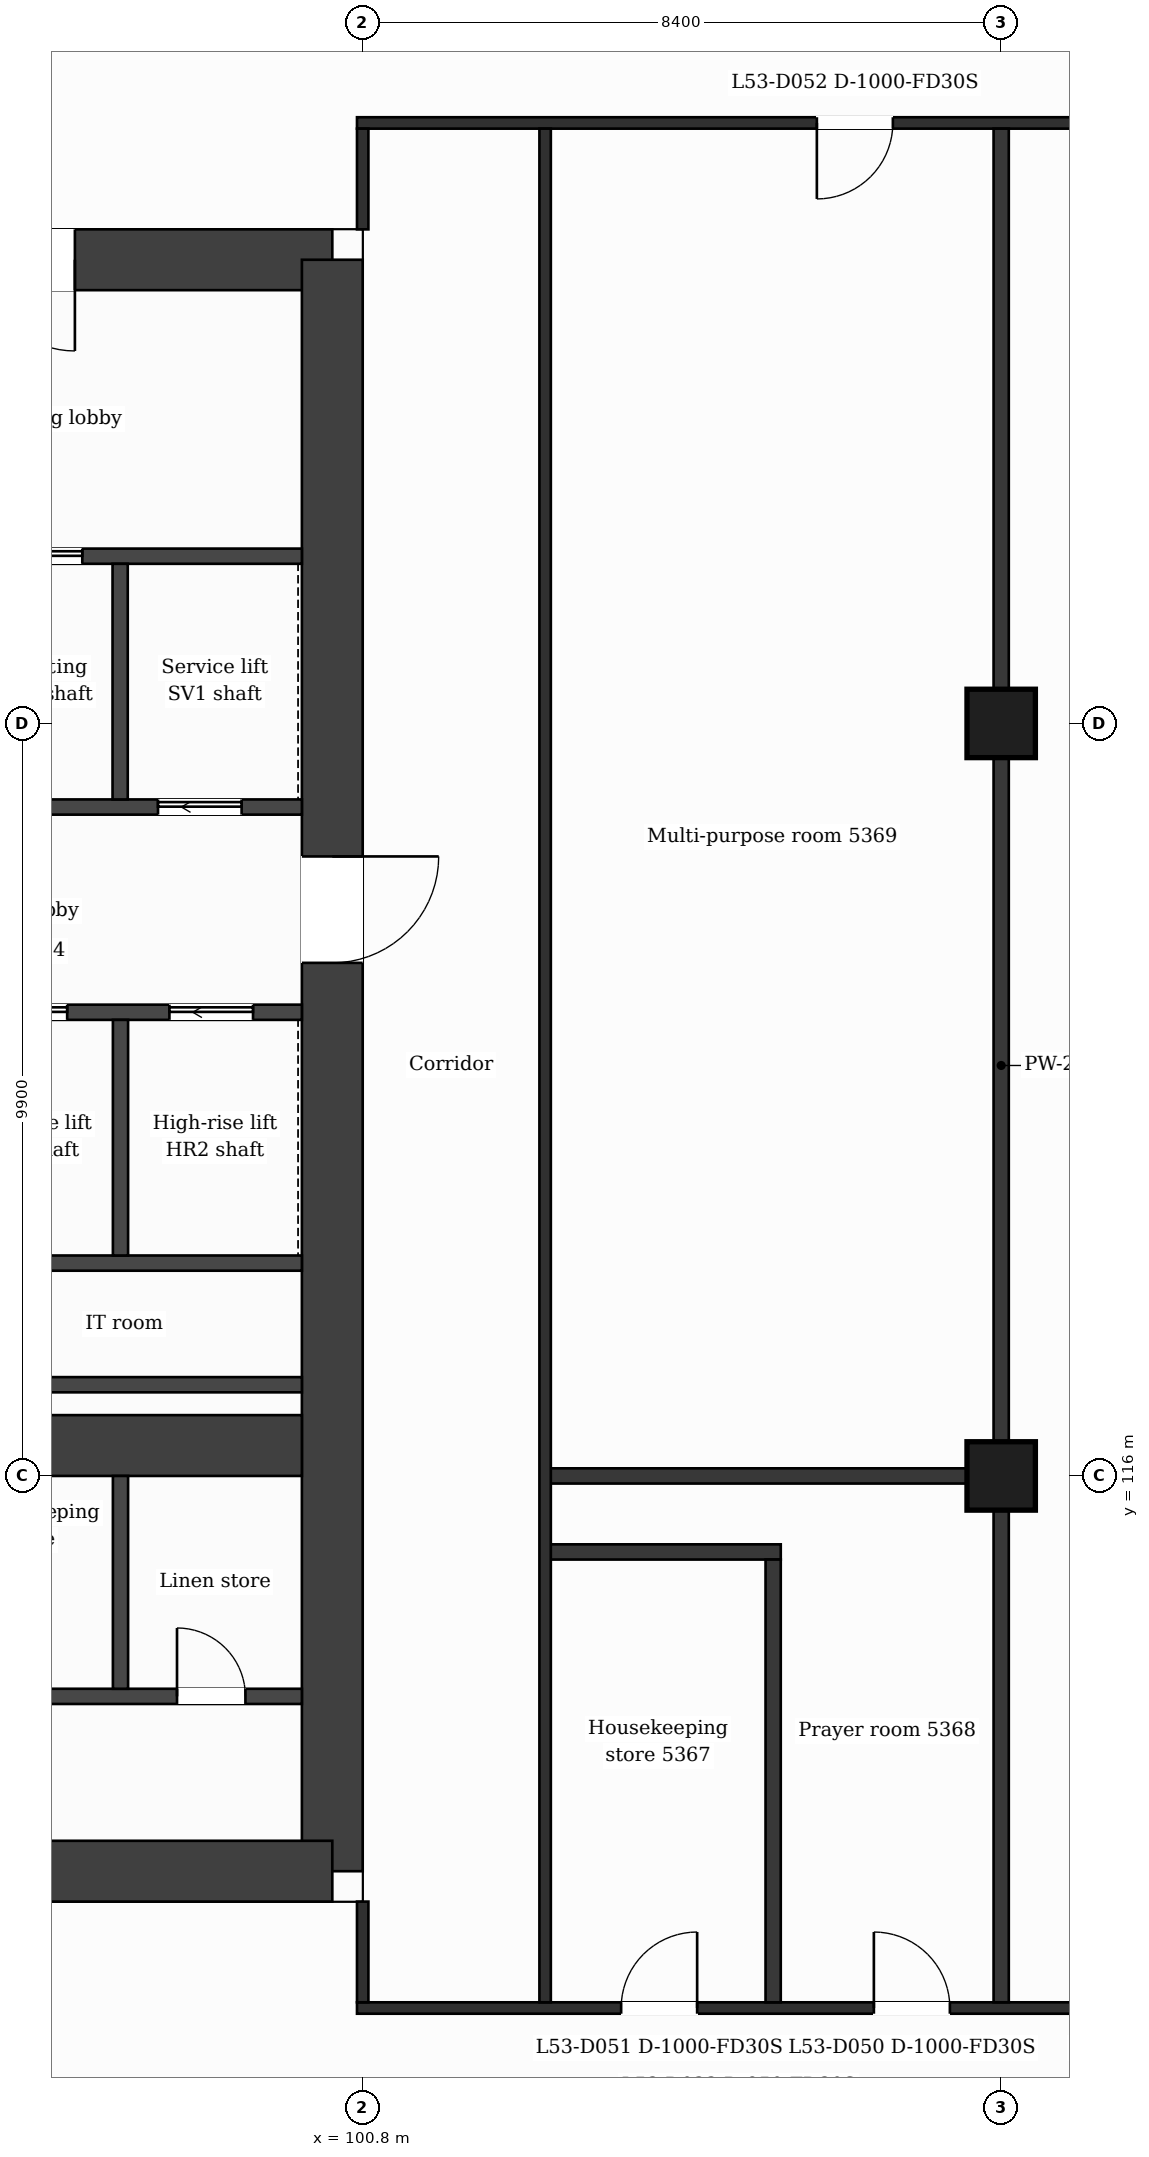
"""IFC4 building model, lengths in metres.
Left out: names, types, materials, properties, quantities, classifications, styles, units other than length and angle.
Written with IfcOpenShell. Run it as: python <this file> out.ifc"""

import sys

from ifc_helpers import new_model, si_unit, direction, frame, frame_2d, origin, origin_2d, place, context, subcontext, project, spatial, rectangle, extrude, element, fill, save


model = new_model("IFC4")
c1 = context("Model", 3, precision=1e-05, world=origin(), true_north=direction((0.0, 1.0)))
c2 = subcontext(c1, "Body", "Model", "MODEL_VIEW")
j1 = project(units=[si_unit("LENGTHUNIT", "METRE"), si_unit("PLANEANGLEUNIT", "RADIAN")], contexts=[c1])
p1 = place(None, origin())
s1 = spatial("IfcSite", under=j1, at=p1, CompositionType="ELEMENT")
p2 = place(p1, origin())
s2 = spatial("IfcBuilding", under=s1, at=p2, CompositionType="ELEMENT")
p3 = place(p2, frame((0.0, 0.0, 220.7)))
s3 = spatial("IfcBuildingStorey", under=s2, at=p3, CompositionType="ELEMENT", Elevation=220.7)
p4 = place(p3, frame((88.98, 132.0, 0.0), z_axis=(0.0, 0.0, 1.0), x_axis=(1.0, 0.0, 0.0)))
e1 = element("IfcWall", 1, at=p4, inside=s3, PredefinedType="SHEAR", context=c2, shape_type="SweptSolid", body=[
    extrude(rectangle(XDim=11.419, YDim=0.8, at=frame_2d((5.71, 0.0))), origin(), (0.0, 0.0, 1.0), 3.7),
])
p5 = place(p4, frame((6.833, 0.0, 0.0)))
e2 = element("IfcOpeningElement", 2, at=p5, cuts=e1, PredefinedType="OPENING", context=c2, shape_type="SweptSolid", body=[
    extrude(rectangle(XDim=1.2, YDim=2.1, at=frame_2d((0.6, 1.05))), frame((0.0, 0.41, 0.0), z_axis=(0.0, -1.0, 0.0), x_axis=(1.0, 0.0, 0.0)), (0.0, 0.0, 1.0), 0.82),
])
p6 = place(p3, frame((100.4, 132.0, 0.0), z_axis=(0.0, 0.0, 1.0), x_axis=(0.0, -1.0, 0.0)))
e3 = element("IfcWall", 3, at=p6, inside=s3, PredefinedType="SHEAR", context=c2, shape_type="SweptSolid", body=[
    extrude(rectangle(XDim=21.2, YDim=0.8, at=frame_2d((10.6, 0.0))), origin(), (0.0, 0.0, 1.0), 3.7),
])
p7 = place(p6, frame((7.85, 0.0, 0.0)))
e4 = element("IfcOpeningElement", 4, at=p7, cuts=e3, PredefinedType="OPENING", context=c2, shape_type="SweptSolid", body=[
    extrude(rectangle(XDim=1.4, YDim=2.1, at=frame_2d((0.7, 1.05))), frame((0.0, 0.41, 0.0), z_axis=(0.0, -1.0, 0.0), x_axis=(1.0, 0.0, 0.0)), (0.0, 0.0, 1.0), 0.82),
])
p8 = place(p3, frame((100.4, 110.8, 0.0), z_axis=(0.0, 0.0, 1.0), x_axis=(-1.0, 0.0, 0.0)))
e5 = element("IfcWall", 5, at=p8, inside=s3, PredefinedType="SHEAR", context=c2, shape_type="SweptSolid", body=[
    extrude(rectangle(XDim=14.273, YDim=0.8, at=frame_2d((7.137, 0.0))), origin(), (0.0, 0.0, 1.0), 3.7),
])
p9 = place(p8, frame((5.908, 0.0, 0.0)))
e6 = element("IfcOpeningElement", 6, at=p9, cuts=e5, PredefinedType="OPENING", context=c2, shape_type="SweptSolid", body=[
    extrude(rectangle(XDim=1.4, YDim=2.1, at=frame_2d((0.7, 1.05))), frame((0.0, 0.41, 0.0), z_axis=(0.0, -1.0, 0.0), x_axis=(1.0, 0.0, 0.0)), (0.0, 0.0, 1.0), 0.82),
])
p10 = place(p3, frame((94.7, 116.4, 0.0), z_axis=(0.0, 0.0, 1.0), x_axis=(1.0, 0.0, 0.0)))
e7 = element("IfcWall", 7, at=p10, inside=s3, PredefinedType="SHEAR", context=c2, shape_type="SweptSolid", body=[
    extrude(rectangle(XDim=5.3, YDim=0.8, at=frame_2d((2.65, 0.0))), origin(), (0.0, 0.0, 1.0), 3.7),
])
for number, where, z_axis, x_axis in (
    (8, (109.2, 116.0, 0.0), (0.0, 0.0, 1.0), (1.0, 0.0, 0.0)),
    (9, (109.2, 125.9, 0.0), (0.0, 0.0, 1.0), (1.0, 0.0, 0.0)),
):
    element("IfcColumn", number, at=place(p3, frame(where, z_axis=z_axis, x_axis=x_axis)), inside=s3, PredefinedType="COLUMN", context=c2, shape_type="SweptSolid", body=[
        extrude(rectangle(XDim=0.9, YDim=0.9, at=origin_2d()), origin(), (0.0, 0.0, 1.0), 3.7),
    ])
p11 = place(p3, frame((100.725, 109.0, 0.0), z_axis=(0.0, 0.0, 1.0), x_axis=(1.0, 0.0, 0.0)))
e10 = element("IfcWall", 10, at=p11, inside=s3, PredefinedType="PARTITIONING", context=c2, shape_type="SweptSolid", body=[
    extrude(rectangle(XDim=25.35, YDim=0.15, at=frame_2d((12.675, 0.0))), origin(), (0.0, 0.0, 1.0), 3.38),
])
p12 = place(p11, frame((6.8, 0.0, 0.0)))
e11 = element("IfcOpeningElement", 11, at=p12, cuts=e10, PredefinedType="OPENING", context=c2, shape_type="SweptSolid", body=[
    extrude(rectangle(XDim=1.0, YDim=2.1, at=frame_2d((0.5, 1.05))), frame((0.0, 0.085, 0.0), z_axis=(0.0, -1.0, 0.0), x_axis=(1.0, 0.0, 0.0)), (0.0, 0.0, 1.0), 0.17),
])
p13 = place(p11, frame((3.475, 0.0, 0.0)))
e12 = element("IfcOpeningElement", 12, at=p13, cuts=e10, PredefinedType="OPENING", context=c2, shape_type="SweptSolid", body=[
    extrude(rectangle(XDim=1.0, YDim=2.1, at=frame_2d((0.5, 1.05))), frame((0.0, 0.085, 0.0), z_axis=(0.0, -1.0, 0.0), x_axis=(1.0, 0.0, 0.0)), (0.0, 0.0, 1.0), 0.17),
])
p14 = place(p11, frame((10.5, 0.0, 0.0)))
e13 = element("IfcOpeningElement", 13, at=p14, cuts=e10, PredefinedType="OPENING", context=c2, shape_type="SweptSolid", body=[
    extrude(rectangle(XDim=1.0, YDim=2.1, at=frame_2d((0.5, 1.05))), frame((0.0, 0.085, 0.0), z_axis=(0.0, -1.0, 0.0), x_axis=(1.0, 0.0, 0.0)), (0.0, 0.0, 1.0), 0.17),
])
p15 = place(p11, frame((19.375, 0.0, 0.0)))
e14 = element("IfcOpeningElement", 14, at=p15, cuts=e10, PredefinedType="OPENING", context=c2, shape_type="SweptSolid", body=[
    extrude(rectangle(XDim=1.0, YDim=2.1, at=frame_2d((0.5, 1.05))), frame((0.0, 0.085, 0.0), z_axis=(0.0, -1.0, 0.0), x_axis=(1.0, 0.0, 0.0)), (0.0, 0.0, 1.0), 0.17),
])
p16 = place(p3, frame((95.127, 113.1, 0.0), z_axis=(0.0, 0.0, 1.0), x_axis=(1.0, 0.0, 0.0)))
e15 = element("IfcWall", 15, at=p16, inside=s3, PredefinedType="PARTITIONING", context=c2, shape_type="SweptSolid", body=[
    extrude(rectangle(XDim=4.873, YDim=0.2, at=frame_2d((2.437, 0.0))), origin(), (0.0, 0.0, 1.0), 3.38),
])
p17 = place(p16, frame((3.23, 0.0, 0.0)))
e16 = element("IfcOpeningElement", 16, at=p17, cuts=e15, PredefinedType="OPENING", context=c2, shape_type="SweptSolid", body=[
    extrude(rectangle(XDim=0.9, YDim=2.1, at=frame_2d((0.45, 1.05))), frame((0.0, 0.11, 0.0), z_axis=(0.0, -1.0, 0.0), x_axis=(1.0, 0.0, 0.0)), (0.0, 0.0, 1.0), 0.22),
])
p18 = place(p3, frame((103.2, 115.0, 0.0), z_axis=(0.0, 0.0, 1.0), x_axis=(1.0, 0.0, 0.0)))
e17 = element("IfcWall", 17, at=p18, inside=s3, PredefinedType="PARTITIONING", context=c2, shape_type="SweptSolid", body=[
    extrude(rectangle(XDim=3.1, YDim=0.2, at=frame_2d((1.55, 0.0))), origin(), (0.0, 0.0, 1.0), 3.38),
])
p19 = place(p3, frame((103.2, 116.0, 0.0), z_axis=(0.0, 0.0, 1.0), x_axis=(1.0, 0.0, 0.0)))
e18 = element("IfcWall", 18, at=p19, inside=s3, PredefinedType="PARTITIONING", context=c2, shape_type="SweptSolid", body=[
    extrude(rectangle(XDim=6.0, YDim=0.2, at=frame_2d((3.0, 0.0))), origin(), (0.0, 0.0, 1.0), 3.38),
])
for number, where, z_axis, x_axis in (
    (19, (95.227, 117.2, 0.0), (0.0, 0.0, 1.0), (1.0, 0.0, 0.0)),
    (20, (95.227, 118.8, 0.0), (0.0, 0.0, 1.0), (1.0, 0.0, 0.0)),
):
    element("IfcWall", number, at=place(p3, frame(where, z_axis=z_axis, x_axis=x_axis)), inside=s3, PredefinedType="PARTITIONING", context=c2, shape_type="SweptSolid", body=[
        extrude(rectangle(XDim=4.773, YDim=0.2, at=frame_2d((2.386, 0.0))), origin(), (0.0, 0.0, 1.0), 3.38),
    ])
p20 = place(p3, frame((95.227, 122.1, 0.0), z_axis=(0.0, 0.0, 1.0), x_axis=(1.0, 0.0, 0.0)))
e21 = element("IfcWall", 21, at=p20, inside=s3, PredefinedType="PARTITIONING", context=c2, shape_type="SweptSolid", body=[
    extrude(rectangle(XDim=4.773, YDim=0.2, at=frame_2d((2.386, 0.0))), origin(), (0.0, 0.0, 1.0), 3.38),
])
p21 = place(p20, frame((0.585, 0.0, 0.0)))
e22 = element("IfcOpeningElement", 22, at=p21, cuts=e21, PredefinedType="OPENING", context=c2, shape_type="SweptSolid", body=[
    extrude(rectangle(XDim=1.1, YDim=2.1, at=frame_2d((0.55, 1.05))), frame((0.0, 0.11, 0.0), z_axis=(0.0, -1.0, 0.0), x_axis=(1.0, 0.0, 0.0)), (0.0, 0.0, 1.0), 0.22),
])
p22 = place(p20, frame((3.03, 0.0, 0.0)))
e23 = element("IfcOpeningElement", 23, at=p22, cuts=e21, PredefinedType="OPENING", context=c2, shape_type="SweptSolid", body=[
    extrude(rectangle(XDim=1.1, YDim=2.1, at=frame_2d((0.55, 1.05))), frame((0.0, 0.11, 0.0), z_axis=(0.0, -1.0, 0.0), x_axis=(1.0, 0.0, 0.0)), (0.0, 0.0, 1.0), 0.22),
])
p23 = place(p3, frame((92.702, 124.8, 0.0), z_axis=(0.0, 0.0, 1.0), x_axis=(1.0, 0.0, 0.0)))
e24 = element("IfcWall", 24, at=p23, inside=s3, PredefinedType="PARTITIONING", context=c2, shape_type="SweptSolid", body=[
    extrude(rectangle(XDim=7.298, YDim=0.2, at=frame_2d((3.649, 0.0))), origin(), (0.0, 0.0, 1.0), 3.38),
])
p24 = place(p23, frame((5.405, 0.0, 0.0)))
e25 = element("IfcOpeningElement", 25, at=p24, cuts=e24, PredefinedType="OPENING", context=c2, shape_type="SweptSolid", body=[
    extrude(rectangle(XDim=1.1, YDim=2.1, at=frame_2d((0.55, 1.05))), frame((0.0, 0.11, 0.0), z_axis=(0.0, -1.0, 0.0), x_axis=(1.0, 0.0, 0.0)), (0.0, 0.0, 1.0), 0.22),
])
p25 = place(p3, frame((92.827, 128.1, 0.0), z_axis=(0.0, 0.0, 1.0), x_axis=(1.0, 0.0, 0.0)))
e26 = element("IfcWall", 26, at=p25, inside=s3, PredefinedType="PARTITIONING", context=c2, shape_type="SweptSolid", body=[
    extrude(rectangle(XDim=7.173, YDim=0.2, at=frame_2d((3.586, 0.0))), origin(), (0.0, 0.0, 1.0), 3.38),
])
p26 = place(p25, frame((3.184, 0.0, 0.0)))
e27 = element("IfcOpeningElement", 27, at=p26, cuts=e26, PredefinedType="OPENING", context=c2, shape_type="SweptSolid", body=[
    extrude(rectangle(XDim=1.1, YDim=2.1, at=frame_2d((0.55, 1.05))), frame((0.0, 0.11, 0.0), z_axis=(0.0, -1.0, 0.0), x_axis=(1.0, 0.0, 0.0)), (0.0, 0.0, 1.0), 0.22),
])
p27 = place(p3, frame((100.725, 133.8, 0.0), z_axis=(0.0, 0.0, 1.0), x_axis=(1.0, 0.0, 0.0)))
e28 = element("IfcWall", 28, at=p27, inside=s3, PredefinedType="PARTITIONING", context=c2, shape_type="SweptSolid", body=[
    extrude(rectangle(XDim=25.35, YDim=0.15, at=frame_2d((12.675, 0.0))), origin(), (0.0, 0.0, 1.0), 3.38),
])
p28 = place(p27, frame((6.05, 0.0, 0.0)))
e29 = element("IfcOpeningElement", 29, at=p28, cuts=e28, PredefinedType="OPENING", context=c2, shape_type="SweptSolid", body=[
    extrude(rectangle(XDim=1.0, YDim=2.1, at=frame_2d((0.5, 1.05))), frame((0.0, 0.085, 0.0), z_axis=(0.0, -1.0, 0.0), x_axis=(1.0, 0.0, 0.0)), (0.0, 0.0, 1.0), 0.17),
])
p29 = place(p27, frame((19.375, 0.0, 0.0)))
e30 = element("IfcOpeningElement", 30, at=p29, cuts=e28, PredefinedType="OPENING", context=c2, shape_type="SweptSolid", body=[
    extrude(rectangle(XDim=1.0, YDim=2.1, at=frame_2d((0.5, 1.05))), frame((0.0, 0.085, 0.0), z_axis=(0.0, -1.0, 0.0), x_axis=(1.0, 0.0, 0.0)), (0.0, 0.0, 1.0), 0.17),
])
p30 = place(p3, frame((97.609, 124.9, 0.0), z_axis=(0.0, 0.0, 1.0), x_axis=(0.0, 1.0, 0.0)))
e31 = element("IfcWall", 31, at=p30, inside=s3, PredefinedType="PARTITIONING", context=c2, shape_type="SweptSolid", body=[
    extrude(rectangle(XDim=3.1, YDim=0.2, at=frame_2d((1.55, 0.0))), origin(), (0.0, 0.0, 1.0), 3.38),
])
p31 = place(p3, frame((97.614, 113.2, 0.0), z_axis=(0.0, 0.0, 1.0), x_axis=(0.0, 1.0, 0.0)))
e32 = element("IfcWall", 32, at=p31, inside=s3, PredefinedType="PARTITIONING", context=c2, shape_type="SweptSolid", body=[
    extrude(rectangle(XDim=2.8, YDim=0.2, at=frame_2d((1.4, 0.0))), origin(), (0.0, 0.0, 1.0), 3.38),
])
p32 = place(p3, frame((97.614, 118.9, 0.0), z_axis=(0.0, 0.0, 1.0), x_axis=(0.0, 1.0, 0.0)))
e33 = element("IfcWall", 33, at=p32, inside=s3, PredefinedType="PARTITIONING", context=c2, shape_type="SweptSolid", body=[
    extrude(rectangle(XDim=3.1, YDim=0.2, at=frame_2d((1.55, 0.0))), origin(), (0.0, 0.0, 1.0), 3.38),
])
p33 = place(p3, frame((100.8, 109.075, 0.0), z_axis=(0.0, 0.0, 1.0), x_axis=(0.0, 1.0, 0.0)))
e34 = element("IfcWall", 34, at=p33, inside=s3, PredefinedType="PARTITIONING", context=c2, shape_type="SweptSolid", body=[
    extrude(rectangle(XDim=1.325, YDim=0.15, at=frame_2d((0.663, 0.0))), origin(), (0.0, 0.0, 1.0), 3.38),
])
p34 = place(p3, frame((100.8, 132.4, 0.0), z_axis=(0.0, 0.0, 1.0), x_axis=(0.0, 1.0, 0.0)))
e35 = element("IfcWall", 35, at=p34, inside=s3, PredefinedType="PARTITIONING", context=c2, shape_type="SweptSolid", body=[
    extrude(rectangle(XDim=1.325, YDim=0.15, at=frame_2d((0.663, 0.0))), origin(), (0.0, 0.0, 1.0), 3.38),
])
p35 = place(p3, frame((103.2, 109.075, 0.0), z_axis=(0.0, 0.0, 1.0), x_axis=(0.0, 1.0, 0.0)))
e36 = element("IfcWall", 36, at=p35, inside=s3, PredefinedType="PARTITIONING", context=c2, shape_type="SweptSolid", body=[
    extrude(rectangle(XDim=24.65, YDim=0.15, at=frame_2d((12.325, 0.0))), origin(), (0.0, 0.0, 1.0), 3.38),
])
p36 = place(p3, frame((106.2, 109.075, 0.0), z_axis=(0.0, 0.0, 1.0), x_axis=(0.0, 1.0, 0.0)))
e37 = element("IfcWall", 37, at=p36, inside=s3, PredefinedType="PARTITIONING", context=c2, shape_type="SweptSolid", body=[
    extrude(rectangle(XDim=5.825, YDim=0.2, at=frame_2d((2.913, 0.0))), origin(), (0.0, 0.0, 1.0), 3.38),
])
p37 = place(p3, frame((109.2, 109.075, 0.0), z_axis=(0.0, 0.0, 1.0), x_axis=(0.0, 1.0, 0.0)))
e38 = element("IfcWall", 38, at=p37, inside=s3, PredefinedType="PARTITIONING", context=c2, shape_type="SweptSolid", body=[
    extrude(rectangle(XDim=24.65, YDim=0.2, at=frame_2d((12.325, 0.0))), origin(), (0.0, 0.0, 1.0), 3.38),
])
p38 = place(p21, origin())
e39 = element("IfcDoor", 39, at=p38, inside=s3, OperationType="SLIDING_TO_LEFT", PredefinedType="DOOR", context=c2, shape_type="SweptSolid", body=[
    extrude(rectangle(XDim=1.1, YDim=2.1, at=frame_2d((0.55, 1.05))), frame((0.0, 0.025, 0.0), z_axis=(0.0, -1.0, 0.0), x_axis=(1.0, 0.0, 0.0)), (0.0, 0.0, 1.0), 0.05),
])
fill(e22, e39)
p39 = place(p22, origin())
e40 = element("IfcDoor", 40, at=p39, inside=s3, OperationType="SLIDING_TO_LEFT", PredefinedType="DOOR", context=c2, shape_type="SweptSolid", body=[
    extrude(rectangle(XDim=1.1, YDim=2.1, at=frame_2d((0.55, 1.05))), frame((0.0, 0.025, 0.0), z_axis=(0.0, -1.0, 0.0), x_axis=(1.0, 0.0, 0.0)), (0.0, 0.0, 1.0), 0.05),
])
fill(e23, e40)
p40 = place(p26, origin())
e41 = element("IfcDoor", 41, at=p40, inside=s3, OperationType="SLIDING_TO_LEFT", PredefinedType="DOOR", context=c2, shape_type="SweptSolid", body=[
    extrude(rectangle(XDim=1.1, YDim=2.1, at=frame_2d((0.55, 1.05))), frame((0.0, 0.025, 0.0), z_axis=(0.0, -1.0, 0.0), x_axis=(1.0, 0.0, 0.0)), (0.0, 0.0, 1.0), 0.05),
])
fill(e27, e41)
p41 = place(p24, origin())
e42 = element("IfcDoor", 42, at=p41, inside=s3, OperationType="SLIDING_TO_LEFT", PredefinedType="DOOR", context=c2, shape_type="SweptSolid", body=[
    extrude(rectangle(XDim=1.1, YDim=2.1, at=frame_2d((0.55, 1.05))), frame((0.0, 0.025, 0.0), z_axis=(0.0, -1.0, 0.0), x_axis=(1.0, 0.0, 0.0)), (0.0, 0.0, 1.0), 0.05),
])
fill(e25, e42)
p42 = place(p17, origin())
e43 = element("IfcDoor", 43, at=p42, inside=s3, OperationType="SINGLE_SWING_LEFT", PredefinedType="DOOR", context=c2, shape_type="SweptSolid", body=[
    extrude(rectangle(XDim=0.9, YDim=2.1, at=frame_2d((0.45, 1.05))), frame((0.0, 0.025, 0.0), z_axis=(0.0, -1.0, 0.0), x_axis=(1.0, 0.0, 0.0)), (0.0, 0.0, 1.0), 0.05),
])
fill(e16, e43)
p43 = place(p12, origin())
e44 = element("IfcDoor", 44, at=p43, inside=s3, OperationType="SINGLE_SWING_LEFT", PredefinedType="DOOR", context=c2, shape_type="SweptSolid", body=[
    extrude(rectangle(XDim=1.0, YDim=2.1, at=frame_2d((0.5, 1.05))), frame((0.0, 0.025, 0.0), z_axis=(0.0, -1.0, 0.0), x_axis=(1.0, 0.0, 0.0)), (0.0, 0.0, 1.0), 0.05),
])
fill(e11, e44)
p44 = place(p13, origin())
e45 = element("IfcDoor", 45, at=p44, inside=s3, OperationType="SINGLE_SWING_RIGHT", PredefinedType="DOOR", context=c2, shape_type="SweptSolid", body=[
    extrude(rectangle(XDim=1.0, YDim=2.1, at=frame_2d((0.5, 1.05))), frame((0.0, 0.025, 0.0), z_axis=(0.0, -1.0, 0.0), x_axis=(1.0, 0.0, 0.0)), (0.0, 0.0, 1.0), 0.05),
])
fill(e12, e45)
p45 = place(p28, origin())
e46 = element("IfcDoor", 46, at=p45, inside=s3, OperationType="SINGLE_SWING_LEFT", PredefinedType="DOOR", context=c2, shape_type="SweptSolid", body=[
    extrude(rectangle(XDim=1.0, YDim=2.1, at=frame_2d((0.5, 1.05))), frame((0.0, 0.025, 0.0), z_axis=(0.0, -1.0, 0.0), x_axis=(1.0, 0.0, 0.0)), (0.0, 0.0, 1.0), 0.05),
])
fill(e29, e46)
p46 = place(p5, origin())
e47 = element("IfcDoor", 47, at=p46, inside=s3, OperationType="SINGLE_SWING_RIGHT", PredefinedType="DOOR", context=c2, shape_type="SweptSolid", body=[
    extrude(rectangle(XDim=1.2, YDim=2.1, at=frame_2d((0.6, 1.05))), frame((0.0, 0.025, 0.0), z_axis=(0.0, -1.0, 0.0), x_axis=(1.0, 0.0, 0.0)), (0.0, 0.0, 1.0), 0.05),
])
fill(e2, e47)
p47 = place(p7, origin())
e48 = element("IfcDoor", 48, at=p47, inside=s3, OperationType="SINGLE_SWING_LEFT", PredefinedType="DOOR", context=c2, shape_type="SweptSolid", body=[
    extrude(rectangle(XDim=1.4, YDim=2.1, at=frame_2d((0.7, 1.05))), frame((0.0, 0.025, 0.0), z_axis=(0.0, -1.0, 0.0), x_axis=(1.0, 0.0, 0.0)), (0.0, 0.0, 1.0), 0.05),
])
fill(e4, e48)
save(model, sys.argv[1])
